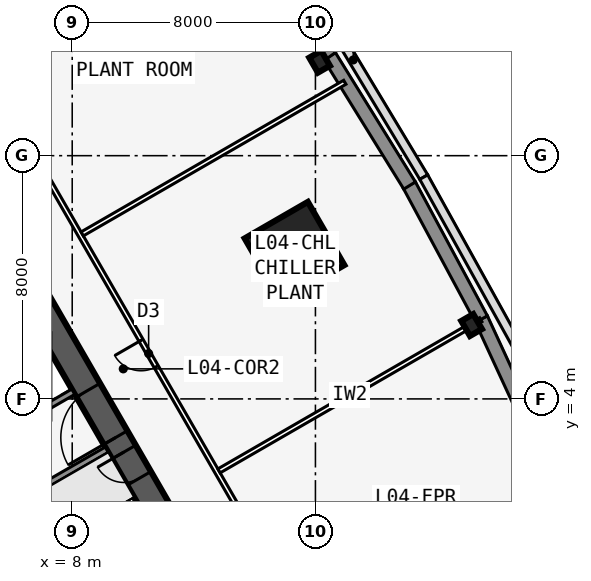
"""IFC4 building model, lengths in metres.
Left out: names, types, materials, properties, quantities, classifications, styles, units other than length and angle.
Written with IfcOpenShell. Run it as: python <this file> out.ifc"""

import sys

from ifc_helpers import new_model, si_unit, direction, frame, frame_2d, origin, origin_2d, place, context, subcontext, project, spatial, polyline, rectangle, i_section, outline, extrude, element, fill, save


model = new_model("IFC4")
c1 = context("Model", 3, precision=1e-05, world=origin(), true_north=direction((0.0, 1.0)))
c2 = subcontext(c1, "Body", "Model", "MODEL_VIEW")
j1 = project(units=[si_unit("LENGTHUNIT", "METRE"), si_unit("PLANEANGLEUNIT", "RADIAN")], contexts=[c1])
p1 = place(None, origin())
s1 = spatial("IfcSite", under=j1, at=p1, CompositionType="ELEMENT")
p2 = place(p1, origin())
s2 = spatial("IfcBuilding", under=s1, at=p2, CompositionType="ELEMENT")
p3 = place(p2, frame((0.0, 0.0, 22.5)))
s3 = spatial("IfcBuildingStorey", under=s2, at=p3, CompositionType="ELEMENT", Elevation=22.5)
p4 = place(p3, frame((16.5, -9.526, 0.0), z_axis=(0.0, 0.0, 1.0), x_axis=(-0.499999749417, 0.866025548458, 0.0)))
e1 = element("IfcWall", 1, at=p4, inside=s3, PredefinedType="SHEAR", context=c2, shape_type="SweptSolid", body=[
    extrude(rectangle(XDim=33.0, YDim=0.9, at=frame_2d((16.5, 0.0))), origin(), (0.0, 0.0, 1.0), 6.0),
])
p5 = place(p4, frame((14.15, 0.0, 0.0)))
e2 = element("IfcOpeningElement", 2, at=p5, cuts=e1, PredefinedType="OPENING", context=c2, shape_type="SweptSolid", body=[
    extrude(rectangle(XDim=1.8, YDim=2.13, at=frame_2d((0.9, 1.065))), frame((0.0, 0.46, 0.0), z_axis=(0.0, -1.0, 0.0), x_axis=(1.0, 0.0, 0.0)), (0.0, 0.0, 1.0), 0.92),
])
p6 = place(p4, frame((12.6, 0.0, 0.0)))
e3 = element("IfcOpeningElement", 3, at=p6, cuts=e1, PredefinedType="OPENING", context=c2, shape_type="SweptSolid", body=[
    extrude(rectangle(XDim=1.0, YDim=2.13, at=frame_2d((0.5, 1.065))), frame((0.0, 0.46, 0.0), z_axis=(0.0, -1.0, 0.0), x_axis=(1.0, 0.0, 0.0)), (0.0, 0.0, 1.0), 0.92),
])
p7 = place(p3, frame((10.245, -5.843, 0.0), z_axis=(0.0, 0.0, 1.0), x_axis=(-0.499993009313, 0.866029439822, 0.0)))
e4 = element("IfcWall", 4, at=p7, inside=s3, PredefinedType="SOLIDWALL", context=c2, shape_type="SweptSolid", body=[
    extrude(rectangle(XDim=7.733, YDim=0.25, at=frame_2d((3.866, 0.0))), origin(), (0.0, 0.0, 1.0), 5.835),
])
for number, where, z_axis, x_axis in (
    (5, (6.429, 0.767, 0.0), (0.0, 0.0, 1.0), (0.866, 0.5, 0.0)),
    (6, (5.329, 2.673, 0.0), (0.0, 0.0, 1.0), (0.866, 0.5, 0.0)),
):
    element("IfcWall", number, at=place(p3, frame(where, z_axis=z_axis, x_axis=x_axis)), inside=s3, PredefinedType="SOLIDWALL", context=c2, shape_type="SweptSolid", body=[
        extrude(rectangle(XDim=3.125, YDim=0.2, at=frame_2d((1.562, 0.0))), origin(), (0.0, 0.0, 1.0), 5.835),
    ])
for number, where, z_axis, x_axis in (
    (7, (21.137, 6.43, 0.0), (0.0, 0.0, 1.0), (0.866, 0.5, 0.0)),
    (8, (16.137, 15.09, 0.0), (0.0, 0.0, 1.0), (0.866, 0.5, 0.0)),
):
    element("IfcColumn", number, at=place(p3, frame(where, z_axis=z_axis, x_axis=x_axis)), inside=s3, PredefinedType="COLUMN", context=c2, shape_type="SweptSolid", body=[
        extrude(i_section(OverallWidth=0.455, OverallDepth=0.569, WebThickness=0.078, FlangeThickness=0.125, at=origin_2d()), origin(), (0.0, 0.0, 1.0), 6.0),
    ])
p8 = place(p3, frame((15.312, 8.84, 0.0), z_axis=(0.0, 0.0, 1.0), x_axis=(0.866025403784, 0.5, 0.0)))
e9 = element("IfcColumn", 9, at=p8, inside=s3, PredefinedType="COLUMN", context=c2, shape_type="SweptSolid", body=[
    extrude(rectangle(XDim=2.4, YDim=2.4, at=origin_2d()), origin(), (0.0, 0.0, 1.0), 6.0),
])
p9 = place(p3, frame((23.557, 2.077, 0.0), z_axis=(0.0, 0.0, 1.0), x_axis=(-0.419203100754, 0.907892482796, 0.0)))
e10 = element("IfcWall", 10, at=p9, inside=s3, PredefinedType="SOLIDWALL", context=c2, shape_type="SweptSolid", body=[
    extrude(outline(polyline([(0.0, 0.0), (5.021, 0.0), (5.021, 5.835), (0.0, 5.835), (0.0, 0.0)]), holes=[polyline([(4.41, 2.917), (4.346, 3.409), (4.156, 3.867), (3.854, 4.261), (3.46, 4.563), (3.002, 4.753), (2.51, 4.817), (2.019, 4.753), (1.56, 4.563), (1.167, 4.261), (0.865, 3.867), (0.675, 3.409), (0.61, 2.917), (0.675, 2.426), (0.865, 1.968), (1.167, 1.574), (1.56, 1.272), (2.019, 1.082), (2.51, 1.018), (3.002, 1.082), (3.46, 1.272), (3.854, 1.574), (4.156, 1.968), (4.346, 2.426), (4.41, 2.917)])]), frame((0.0, 0.225, 0.0), z_axis=(0.0, -1.0, 0.0), x_axis=(1.0, 0.0, 0.0)), (0.0, 0.0, 1.0), 0.45),
])
p10 = place(p3, frame((21.458, 6.624, 0.0), z_axis=(0.0, 0.0, 1.0), x_axis=(-0.473412820489, 0.880840678782, 0.0)))
e11 = element("IfcWall", 11, at=p10, inside=s3, PredefinedType="SOLIDWALL", context=c2, shape_type="SweptSolid", body=[
    extrude(outline(polyline([(0.0, 0.0), (5.002, 0.0), (5.002, 5.835), (0.0, 5.835), (0.0, 0.0)]), holes=[polyline([(4.401, 2.917), (4.336, 3.409), (4.146, 3.867), (3.845, 4.261), (3.451, 4.563), (2.993, 4.753), (2.501, 4.817), (2.01, 4.753), (1.551, 4.563), (1.158, 4.261), (0.856, 3.867), (0.666, 3.409), (0.601, 2.917), (0.666, 2.426), (0.856, 1.968), (1.158, 1.574), (1.551, 1.272), (2.01, 1.082), (2.501, 1.018), (2.993, 1.082), (3.451, 1.272), (3.845, 1.574), (4.146, 1.968), (4.336, 2.426), (4.401, 2.917)])]), frame((0.0, 0.225, 0.0), z_axis=(0.0, -1.0, 0.0), x_axis=(1.0, 0.0, 0.0)), (0.0, 0.0, 1.0), 0.45),
])
p11 = place(p3, frame((19.097, 11.018, 0.0), z_axis=(0.0, 0.0, 1.0), x_axis=(-0.52611097126, 0.850415925251, 0.0)))
e12 = element("IfcWall", 12, at=p11, inside=s3, PredefinedType="SOLIDWALL", context=c2, shape_type="SweptSolid", body=[
    extrude(outline(polyline([(0.0, 0.0), (5.002, 0.0), (5.002, 5.835), (0.0, 5.835), (0.0, 0.0)]), holes=[polyline([(4.401, 2.917), (4.336, 3.409), (4.146, 3.867), (3.844, 4.261), (3.451, 4.563), (2.993, 4.753), (2.501, 4.817), (2.01, 4.753), (1.551, 4.563), (1.158, 4.261), (0.856, 3.867), (0.666, 3.409), (0.601, 2.917), (0.666, 2.426), (0.856, 1.968), (1.158, 1.574), (1.551, 1.272), (2.01, 1.082), (2.501, 1.018), (2.993, 1.082), (3.451, 1.272), (3.844, 1.574), (4.146, 1.968), (4.336, 2.426), (4.401, 2.917)])]), frame((0.0, 0.225, 0.0), z_axis=(0.0, -1.0, 0.0), x_axis=(1.0, 0.0, 0.0)), (0.0, 0.0, 1.0), 0.45),
])
p12 = place(p3, frame((16.473, 15.26, 0.0), z_axis=(0.0, 0.0, 1.0), x_axis=(-0.5766431066, 0.81699616132, 0.0)))
e13 = element("IfcWall", 13, at=p12, inside=s3, PredefinedType="SOLIDWALL", context=c2, shape_type="SweptSolid", body=[
    extrude(outline(polyline([(0.0, 0.0), (5.021, 0.0), (5.021, 5.835), (0.0, 5.835), (0.0, 0.0)]), holes=[polyline([(4.41, 2.917), (4.346, 3.409), (4.156, 3.867), (3.854, 4.261), (3.46, 4.563), (3.002, 4.753), (2.51, 4.817), (2.019, 4.753), (1.56, 4.563), (1.167, 4.261), (0.865, 3.867), (0.675, 3.409), (0.61, 2.917), (0.675, 2.426), (0.865, 1.968), (1.167, 1.574), (1.56, 1.272), (2.019, 1.082), (2.51, 1.018), (3.002, 1.082), (3.46, 1.272), (3.854, 1.574), (4.156, 1.968), (4.346, 2.426), (4.41, 2.917)])]), frame((0.0, 0.225, 0.0), z_axis=(0.0, -1.0, 0.0), x_axis=(1.0, 0.0, 0.0)), (0.0, 0.0, 1.0), 0.45),
])
p13 = place(p3, frame((14.925, 19.003, 0.0), z_axis=(0.0, 0.0, 1.0), x_axis=(0.515513067343, -0.856881717274, 0.0)))
e14 = element("IfcWall", 14, at=p13, inside=s3, PredefinedType="PARAPET", context=c2, shape_type="SweptSolid", body=[
    extrude(rectangle(XDim=8.996, YDim=0.3, at=frame_2d((4.498, 0.0))), origin(), (0.0, 0.0, 1.0), 1.1),
])
p14 = place(p3, frame((19.563, 11.295, 0.0), z_axis=(0.0, 0.0, 1.0), x_axis=(0.484315141127, -0.874893618719, 0.0)))
e15 = element("IfcWall", 15, at=p14, inside=s3, PredefinedType="PARAPET", context=c2, shape_type="SweptSolid", body=[
    extrude(rectangle(XDim=8.996, YDim=0.3, at=frame_2d((4.498, 0.0))), origin(), (0.0, 0.0, 1.0), 1.1),
])
p15 = place(p3, frame((20.027, -10.985, 0.0), z_axis=(0.0, 0.0, 1.0), x_axis=(-0.500001677587, 0.866024435227, 0.0)))
e16 = element("IfcWall", 16, at=p15, inside=s3, PredefinedType="PARTITIONING", context=c2, shape_type="SweptSolid", body=[
    extrude(rectangle(XDim=39.054, YDim=0.15, at=frame_2d((19.527, 0.0))), origin(), (0.0, 0.0, 1.0), 5.835),
])
p16 = place(p15, frame((6.914, 0.0, 0.0)))
e17 = element("IfcOpeningElement", 17, at=p16, cuts=e16, PredefinedType="OPENING", context=c2, shape_type="SweptSolid", body=[
    extrude(rectangle(XDim=1.0, YDim=2.13, at=frame_2d((0.5, 1.065))), frame((0.0, 0.085, 0.0), z_axis=(0.0, -1.0, 0.0), x_axis=(1.0, 0.0, 0.0)), (0.0, 0.0, 1.0), 0.17),
])
p17 = place(p15, frame((18.527, 0.0, 0.0)))
e18 = element("IfcOpeningElement", 18, at=p17, cuts=e16, PredefinedType="OPENING", context=c2, shape_type="SweptSolid", body=[
    extrude(rectangle(XDim=1.0, YDim=2.13, at=frame_2d((0.5, 1.065))), frame((0.0, 0.085, 0.0), z_axis=(0.0, -1.0, 0.0), x_axis=(1.0, 0.0, 0.0)), (0.0, 0.0, 1.0), 0.17),
])
p18 = place(p15, frame((30.64, 0.0, 0.0)))
e19 = element("IfcOpeningElement", 19, at=p18, cuts=e16, PredefinedType="OPENING", context=c2, shape_type="SweptSolid", body=[
    extrude(rectangle(XDim=1.0, YDim=2.13, at=frame_2d((0.5, 1.065))), frame((0.0, 0.085, 0.0), z_axis=(0.0, -1.0, 0.0), x_axis=(1.0, 0.0, 0.0)), (0.0, 0.0, 1.0), 0.17),
])
p19 = place(p3, frame((12.829, 1.633, 0.0), z_axis=(0.0, 0.0, 1.0), x_axis=(0.866026934769, 0.499997348248, 0.0)))
e20 = element("IfcWall", 20, at=p19, inside=s3, PredefinedType="PARTITIONING", context=c2, shape_type="SweptSolid", body=[
    extrude(rectangle(XDim=9.943, YDim=0.15, at=frame_2d((4.971, 0.0))), origin(), (0.0, 0.0, 1.0), 4.794),
])
p20 = place(p3, frame((8.329, 9.427, 0.0), z_axis=(0.0, 0.0, 1.0), x_axis=(0.866027840197, 0.499995779986, 0.0)))
e21 = element("IfcWall", 21, at=p20, inside=s3, PredefinedType="PARTITIONING", context=c2, shape_type="SweptSolid", body=[
    extrude(rectangle(XDim=9.974, YDim=0.15, at=frame_2d((4.987, 0.0))), origin(), (0.0, 0.0, 1.0), 5.835),
])
p21 = place(p17, origin())
e22 = element("IfcDoor", 22, at=p21, inside=s3, OperationType="SINGLE_SWING_RIGHT", PredefinedType="DOOR", context=c2, shape_type="SweptSolid", body=[
    extrude(rectangle(XDim=1.0, YDim=2.13, at=frame_2d((0.5, 1.065))), frame((0.0, 0.025, 0.0), z_axis=(0.0, -1.0, 0.0), x_axis=(1.0, 0.0, 0.0)), (0.0, 0.0, 1.0), 0.05),
])
fill(e18, e22)
p22 = place(p5, origin())
e23 = element("IfcDoor", 23, at=p22, inside=s3, OperationType="DOUBLE_DOOR_SINGLE_SWING", PredefinedType="DOOR", context=c2, shape_type="SweptSolid", body=[
    extrude(rectangle(XDim=1.8, YDim=2.13, at=frame_2d((0.9, 1.065))), frame((0.0, 0.025, 0.0), z_axis=(0.0, -1.0, 0.0), x_axis=(1.0, 0.0, 0.0)), (0.0, 0.0, 1.0), 0.05),
])
fill(e2, e23)
p23 = place(p6, origin())
e24 = element("IfcDoor", 24, at=p23, inside=s3, OperationType="SINGLE_SWING_RIGHT", PredefinedType="DOOR", context=c2, shape_type="SweptSolid", body=[
    extrude(rectangle(XDim=1.0, YDim=2.13, at=frame_2d((0.5, 1.065))), frame((0.0, 0.025, 0.0), z_axis=(0.0, -1.0, 0.0), x_axis=(1.0, 0.0, 0.0)), (0.0, 0.0, 1.0), 0.05),
])
fill(e3, e24)
save(model, sys.argv[1])
